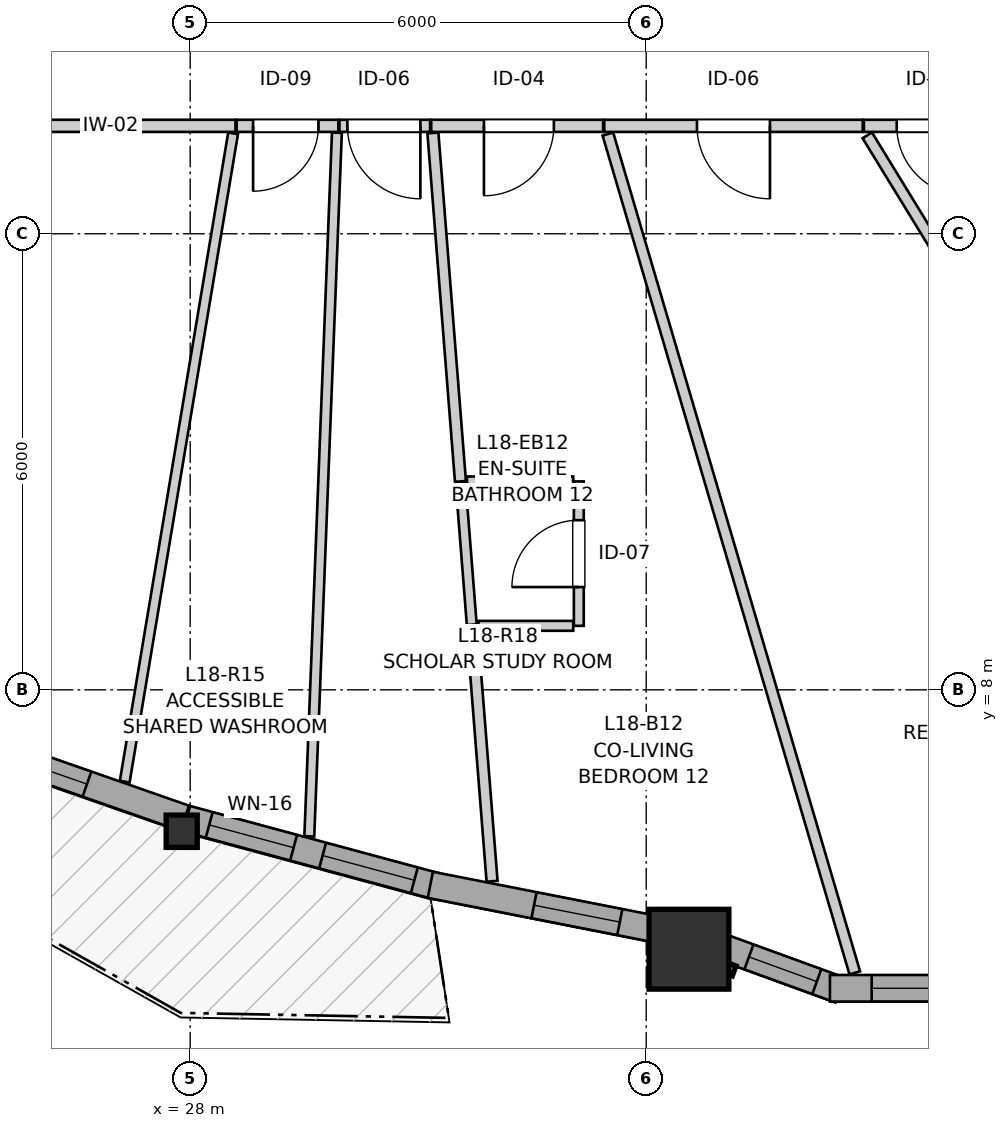
"""IFC4 building model, lengths in metres.
Left out: names, types, materials, properties, quantities, classifications, styles, units other than length and angle.
Written with IfcOpenShell. Run it as: python <this file> out.ifc"""

import sys

from ifc_helpers import new_model, si_unit, direction, frame, frame_2d, origin, origin_2d, place, context, subcontext, project, spatial, rectangle, i_section, extrude, source, transform, mapped, element, fill, save


model = new_model("IFC4")
c1 = context("Model", 3, precision=1e-05, world=origin(), true_north=direction((0.0, 1.0)))
c2 = subcontext(c1, "Body", "Model", "MODEL_VIEW")
j1 = project(units=[si_unit("LENGTHUNIT", "METRE"), si_unit("PLANEANGLEUNIT", "RADIAN")], contexts=[c1])
p1 = place(None, origin())
s1 = spatial("IfcSite", under=j1, at=p1, CompositionType="ELEMENT")
p2 = place(p1, origin())
s2 = spatial("IfcBuilding", under=s1, at=p2, CompositionType="ELEMENT")
p3 = place(p2, frame((0.0, 0.0, 62.2)))
s3 = spatial("IfcBuildingStorey", under=s2, at=p3, CompositionType="ELEMENT", Elevation=62.2)
m1 = source(origin(), c2, "Body", "SweptSolid", [
    extrude(i_section(OverallWidth=0.409, OverallDepth=0.425, WebThickness=0.03, FlangeThickness=0.048, FilletRadius=0.015, at=origin_2d()), origin(), (0.0, 0.0, 1.0), 2.9),
])
p4 = place(p3, frame((27.888, 6.139, 0.0), z_axis=(0.0, 0.0, 1.0), x_axis=(1.0, 0.0, 0.0)))
e1 = element("IfcColumn", 1, at=p4, inside=s3, PredefinedType="PILASTER", context=c2, shape_type="MappedRepresentation", body=[
    mapped(m1, transform((0.0, 0.0, 0.0), x_axis=(1.0, 0.0, 0.0), y_axis=(0.0, 1.0, 0.0), z_axis=(0.0, 0.0, 1.0), scale=1.0)),
])
m2 = source(origin(), c2, "Body", "SweptSolid", [
    extrude(rectangle(XDim=1.05, YDim=1.05, at=origin_2d()), origin(), (0.0, 0.0, 1.0), 2.9),
])
p5 = place(p3, frame((34.562, 4.587, 0.0), z_axis=(0.0, 0.0, 1.0), x_axis=(1.0, 0.0, 0.0)))
e2 = element("IfcColumn", 2, at=p5, inside=s3, PredefinedType="COLUMN", context=c2, shape_type="MappedRepresentation", body=[
    mapped(m2, transform((0.0, 0.0, 0.0), x_axis=(1.0, 0.0, 0.0), y_axis=(0.0, 1.0, 0.0), z_axis=(0.0, 0.0, 1.0), scale=1.0)),
])
p6 = place(p3, frame((24.76, 7.417, 0.0), z_axis=(0.0, 0.0, 1.0), x_axis=(0.944134890247, -0.329559264804, 0.0)))
e3 = element("IfcWall", 3, at=p6, inside=s3, PredefinedType="SOLIDWALL", context=c2, shape_type="SweptSolid", body=[
    extrude(rectangle(XDim=3.354, YDim=0.35, at=frame_2d((1.677, 0.0))), origin(), (0.0, 0.0, 1.0), 2.38),
])
p7 = place(p6, frame((0.543, 0.0, 0.82)))
e4 = element("IfcOpeningElement", 4, at=p7, cuts=e3, PredefinedType="OPENING", context=c2, shape_type="SweptSolid", body=[
    extrude(rectangle(XDim=1.45, YDim=1.25, at=frame_2d((0.725, 0.625))), frame((0.0, 0.185, 0.0), z_axis=(0.0, -1.0, 0.0), x_axis=(1.0, 0.0, 0.0)), (0.0, 0.0, 1.0), 0.37),
])
p8 = place(p3, frame((27.953, 6.303, 0.0), z_axis=(0.0, 0.0, 1.0), x_axis=(0.965464207527, -0.260535724968, 0.0)))
e5 = element("IfcWall", 5, at=p8, inside=s3, PredefinedType="SOLIDWALL", context=c2, shape_type="SweptSolid", body=[
    extrude(rectangle(XDim=3.41, YDim=0.35, at=frame_2d((1.705, 0.0))), origin(), (0.0, 0.0, 1.0), 2.38),
])
p9 = place(p8, frame((0.308, 0.0, 0.82)))
e6 = element("IfcOpeningElement", 6, at=p9, cuts=e5, PredefinedType="OPENING", context=c2, shape_type="SweptSolid", body=[
    extrude(rectangle(XDim=1.15, YDim=1.2, at=frame_2d((0.575, 0.6))), frame((0.0, 0.185, 0.0), z_axis=(0.0, -1.0, 0.0), x_axis=(1.0, 0.0, 0.0)), (0.0, 0.0, 1.0), 0.37),
])
p10 = place(p8, frame((1.853, 0.0, 0.82)))
e7 = element("IfcOpeningElement", 7, at=p10, cuts=e5, PredefinedType="OPENING", context=c2, shape_type="SweptSolid", body=[
    extrude(rectangle(XDim=1.25, YDim=1.35, at=frame_2d((0.625, 0.675))), frame((0.0, 0.185, 0.0), z_axis=(0.0, -1.0, 0.0), x_axis=(1.0, 0.0, 0.0)), (0.0, 0.0, 1.0), 0.37),
])
p11 = place(p3, frame((31.16, 5.435, 0.0), z_axis=(0.0, 0.0, 1.0), x_axis=(0.981237747431, -0.192801667567, 0.0)))
e8 = element("IfcWall", 8, at=p11, inside=s3, PredefinedType="SOLIDWALL", context=c2, shape_type="SweptSolid", body=[
    extrude(rectangle(XDim=3.202, YDim=0.35, at=frame_2d((1.601, 0.0))), origin(), (0.0, 0.0, 1.0), 2.38),
])
p12 = place(p11, frame((1.39, 0.0, 0.82)))
e9 = element("IfcOpeningElement", 9, at=p12, cuts=e8, PredefinedType="OPENING", context=c2, shape_type="SweptSolid", body=[
    extrude(rectangle(XDim=1.15, YDim=1.2, at=frame_2d((0.575, 0.6))), frame((0.0, 0.185, 0.0), z_axis=(0.0, -1.0, 0.0), x_axis=(1.0, 0.0, 0.0)), (0.0, 0.0, 1.0), 0.37),
])
p13 = place(p3, frame((34.904, 4.649, 0.0), z_axis=(0.0, 0.0, 1.0), x_axis=(0.939675390388, -0.342067479745, 0.0)))
e10 = element("IfcWall", 10, at=p13, inside=s3, PredefinedType="SOLIDWALL", context=c2, shape_type="SweptSolid", body=[
    extrude(rectangle(XDim=1.752, YDim=0.35, at=frame_2d((0.876, 0.0))), origin(), (0.0, 0.0, 1.0), 2.38),
])
p14 = place(p13, frame((0.476, 0.0, 0.82)))
e11 = element("IfcOpeningElement", 11, at=p14, cuts=e10, PredefinedType="OPENING", context=c2, shape_type="SweptSolid", body=[
    extrude(rectangle(XDim=0.95, YDim=1.35, at=frame_2d((0.475, 0.675))), frame((0.0, 0.185, 0.0), z_axis=(0.0, -1.0, 0.0), x_axis=(1.0, 0.0, 0.0)), (0.0, 0.0, 1.0), 0.37),
])
p15 = place(p3, frame((36.417, 4.073, 0.0), z_axis=(0.0, 0.0, 1.0), x_axis=(1.0, 0.0, 0.0)))
e12 = element("IfcWall", 12, at=p15, inside=s3, PredefinedType="SOLIDWALL", context=c2, shape_type="SweptSolid", body=[
    extrude(rectangle(XDim=2.091, YDim=0.35, at=frame_2d((1.045, 0.0))), origin(), (0.0, 0.0, 1.0), 2.38),
])
p16 = place(p15, frame((0.549, 0.0, 0.82)))
e13 = element("IfcOpeningElement", 13, at=p16, cuts=e12, PredefinedType="OPENING", context=c2, shape_type="SweptSolid", body=[
    extrude(rectangle(XDim=1.25, YDim=1.35, at=frame_2d((0.625, 0.675))), frame((0.0, 0.185, 0.0), z_axis=(0.0, -1.0, 0.0), x_axis=(1.0, 0.0, 0.0)), (0.0, 0.0, 1.0), 0.37),
])
p17 = place(p3, frame((28.596, 15.42, 0.0), z_axis=(0.0, 0.0, 1.0), x_axis=(-1.0, 0.0, 0.0)))
e14 = element("IfcWall", 14, at=p17, inside=s3, PredefinedType="PARTITIONING", context=c2, shape_type="SweptSolid", body=[
    extrude(rectangle(XDim=6.576, YDim=0.16, at=frame_2d((3.288, 0.0))), origin(), (0.0, 0.0, 1.0), 2.9),
])
p18 = place(p17, frame((2.646, 0.0, 0.0)))
e15 = element("IfcOpeningElement", 15, at=p18, cuts=e14, PredefinedType="OPENING", context=c2, shape_type="SweptSolid", body=[
    extrude(rectangle(XDim=1.3, YDim=2.1, at=frame_2d((0.65, 1.05))), frame((0.0, 0.09, 0.0), z_axis=(0.0, -1.0, 0.0), x_axis=(1.0, 0.0, 0.0)), (0.0, 0.0, 1.0), 0.18),
])
p19 = place(p3, frame((36.849, 15.42, 0.0), z_axis=(0.0, 0.0, 1.0), x_axis=(-1.0, 0.0, 0.0)))
e16 = element("IfcWall", 16, at=p19, inside=s3, PredefinedType="PARTITIONING", context=c2, shape_type="SweptSolid", body=[
    extrude(rectangle(XDim=3.401, YDim=0.16, at=frame_2d((1.701, 0.0))), origin(), (0.0, 0.0, 1.0), 2.9),
])
p20 = place(p19, frame((1.221, 0.0, 0.0)))
e17 = element("IfcOpeningElement", 17, at=p20, cuts=e16, PredefinedType="OPENING", context=c2, shape_type="SweptSolid", body=[
    extrude(rectangle(XDim=0.96, YDim=2.1, at=frame_2d((0.48, 1.05))), frame((0.0, 0.09, 0.0), z_axis=(0.0, -1.0, 0.0), x_axis=(1.0, 0.0, 0.0)), (0.0, 0.0, 1.0), 0.18),
])
p21 = place(p3, frame((33.433, 15.42, 0.0), z_axis=(0.0, 0.0, 1.0), x_axis=(-1.0, 0.0, 0.0)))
e18 = element("IfcWall", 18, at=p21, inside=s3, PredefinedType="PARTITIONING", context=c2, shape_type="SweptSolid", body=[
    extrude(rectangle(XDim=2.262, YDim=0.16, at=frame_2d((1.131, 0.0))), origin(), (0.0, 0.0, 1.0), 2.9),
])
p22 = place(p21, frame((0.648, 0.0, 0.0)))
e19 = element("IfcOpeningElement", 19, at=p22, cuts=e18, PredefinedType="OPENING", context=c2, shape_type="SweptSolid", body=[
    extrude(rectangle(XDim=0.92, YDim=2.1, at=frame_2d((0.46, 1.05))), frame((0.0, 0.09, 0.0), z_axis=(0.0, -1.0, 0.0), x_axis=(1.0, 0.0, 0.0)), (0.0, 0.0, 1.0), 0.18),
])
p23 = place(p3, frame((33.113, 8.842, 0.0), z_axis=(0.0, 0.0, 1.0), x_axis=(0.0, 1.0, 0.0)))
e20 = element("IfcWall", 20, at=p23, inside=s3, PredefinedType="PARTITIONING", context=c2, shape_type="SweptSolid", body=[
    extrude(rectangle(XDim=1.9, YDim=0.13, at=frame_2d((0.95, 0.0))), origin(), (0.0, 0.0, 1.0), 2.268),
])
p24 = place(p23, frame((0.51, 0.0, 0.0)))
e21 = element("IfcOpeningElement", 21, at=p24, cuts=e20, PredefinedType="OPENING", context=c2, shape_type="SweptSolid", body=[
    extrude(rectangle(XDim=0.88, YDim=2.05, at=frame_2d((0.44, 1.025))), frame((0.0, 0.075, 0.0), z_axis=(0.0, -1.0, 0.0), x_axis=(1.0, 0.0, 0.0)), (0.0, 0.0, 1.0), 0.15),
])
p25 = place(p3, frame((38.68, 15.42, 0.0), z_axis=(0.0, 0.0, 1.0), x_axis=(-1.0, 0.0, 0.0)))
e22 = element("IfcWall", 22, at=p25, inside=s3, PredefinedType="PARTITIONING", context=c2, shape_type="SweptSolid", body=[
    extrude(rectangle(XDim=1.816, YDim=0.16, at=frame_2d((0.908, 0.0))), origin(), (0.0, 0.0, 1.0), 2.9),
])
p26 = place(p25, frame((0.464, 0.0, 0.0)))
e23 = element("IfcOpeningElement", 23, at=p26, cuts=e22, PredefinedType="OPENING", context=c2, shape_type="SweptSolid", body=[
    extrude(rectangle(XDim=0.92, YDim=2.1, at=frame_2d((0.46, 1.05))), frame((0.0, 0.09, 0.0), z_axis=(0.0, -1.0, 0.0), x_axis=(1.0, 0.0, 0.0)), (0.0, 0.0, 1.0), 0.18),
])
p27 = place(p3, frame((29.949, 15.42, 0.0), z_axis=(0.0, 0.0, 1.0), x_axis=(-1.0, 0.0, 0.0)))
e24 = element("IfcWall", 24, at=p27, inside=s3, PredefinedType="PARTITIONING", context=c2, shape_type="SweptSolid", body=[
    extrude(rectangle(XDim=1.338, YDim=0.16, at=frame_2d((0.669, 0.0))), origin(), (0.0, 0.0, 1.0), 2.9),
])
p28 = place(p27, frame((0.261, 0.0, 0.0)))
e25 = element("IfcOpeningElement", 25, at=p28, cuts=e24, PredefinedType="OPENING", context=c2, shape_type="SweptSolid", body=[
    extrude(rectangle(XDim=0.86, YDim=2.05, at=frame_2d((0.43, 1.025))), frame((0.0, 0.09, 0.0), z_axis=(0.0, -1.0, 0.0), x_axis=(1.0, 0.0, 0.0)), (0.0, 0.0, 1.0), 0.18),
])
p29 = place(p3, frame((31.156, 15.42, 0.0), z_axis=(0.0, 0.0, 1.0), x_axis=(-1.0, 0.0, 0.0)))
e26 = element("IfcWall", 26, at=p29, inside=s3, PredefinedType="PARTITIONING", context=c2, shape_type="SweptSolid", body=[
    extrude(rectangle(XDim=1.192, YDim=0.16, at=frame_2d((0.596, 0.0))), origin(), (0.0, 0.0, 1.0), 2.9),
])
p30 = place(p29, frame((0.128, 0.0, 0.0)))
e27 = element("IfcOpeningElement", 27, at=p30, cuts=e26, PredefinedType="OPENING", context=c2, shape_type="SweptSolid", body=[
    extrude(rectangle(XDim=0.96, YDim=2.1, at=frame_2d((0.48, 1.05))), frame((0.0, 0.09, 0.0), z_axis=(0.0, -1.0, 0.0), x_axis=(1.0, 0.0, 0.0)), (0.0, 0.0, 1.0), 0.18),
])
p31 = place(p3, frame((33.496, 15.312, 0.0), z_axis=(0.0, 0.0, 1.0), x_axis=(0.282353610079, -0.959310397564, 0.0)))
e28 = element("IfcWall", 28, at=p31, inside=s3, PredefinedType="PARTITIONING", context=c2, shape_type="SweptSolid", body=[
    extrude(rectangle(XDim=11.503, YDim=0.145, at=frame_2d((5.752, 0.0))), origin(), (0.0, 0.0, 1.0), 2.9),
])
p32 = place(p3, frame((36.908, 15.295, 0.0), z_axis=(0.0, 0.0, 1.0), x_axis=(0.522407183079, -0.852696156358, 0.0)))
e29 = element("IfcWall", 29, at=p32, inside=s3, PredefinedType="PARTITIONING", context=c2, shape_type="SweptSolid", body=[
    extrude(rectangle(XDim=9.87, YDim=0.145, at=frame_2d((4.935, 0.0))), origin(), (0.0, 0.0, 1.0), 2.9),
])
p33 = place(p3, frame((29.567, 6.072, 0.0), z_axis=(0.0, 0.0, 1.0), x_axis=(0.039185050788, 0.999231970963, 0.0)))
e30 = element("IfcWall", 30, at=p33, inside=s3, PredefinedType="PARTITIONING", context=c2, shape_type="SweptSolid", body=[
    extrude(rectangle(XDim=9.265, YDim=0.13, at=frame_2d((4.632, 0.0))), origin(), (0.0, 0.0, 1.0), 2.9),
])
p34 = place(p3, frame((27.139, 6.792, 0.0), z_axis=(0.0, 0.0, 1.0), x_axis=(0.164847632872, 0.986319044699, 0.0)))
e31 = element("IfcWall", 31, at=p34, inside=s3, PredefinedType="PARTITIONING", context=c2, shape_type="SweptSolid", body=[
    extrude(rectangle(XDim=8.648, YDim=0.13, at=frame_2d((4.324, 0.0))), origin(), (0.0, 0.0, 1.0), 2.9),
])
p35 = place(p3, frame((31.193, 15.326, 0.0), z_axis=(0.0, 0.0, 1.0), x_axis=(0.078835771191, -0.996887617127, 0.0)))
e32 = element("IfcWall", 32, at=p35, inside=s3, PredefinedType="PARTITIONING", context=c2, shape_type="SweptSolid", body=[
    extrude(rectangle(XDim=4.599, YDim=0.145, at=frame_2d((2.299, 0.0))), origin(), (0.0, 0.0, 1.0), 2.9),
])
p36 = place(p3, frame((31.706, 8.842, 0.0), z_axis=(0.0, 0.0, 1.0), x_axis=(0.078861571463, -0.996885576456, 0.0)))
e33 = element("IfcWall", 33, at=p36, inside=s3, PredefinedType="PARTITIONING", context=c2, shape_type="SweptSolid", body=[
    extrude(rectangle(XDim=3.371, YDim=0.145, at=frame_2d((1.686, 0.0))), origin(), (0.0, 0.0, 1.0), 2.9),
])
p37 = place(p3, frame((31.557, 10.727, 0.0), z_axis=(0.0, 0.0, 1.0), x_axis=(0.078736521399, -0.996895461018, 0.0)))
e34 = element("IfcWall", 34, at=p37, inside=s3, PredefinedType="PARTITIONING", context=c2, shape_type="SweptSolid", body=[
    extrude(rectangle(XDim=1.876, YDim=0.13, at=frame_2d((0.938, 0.0))), origin(), (0.0, 0.0, 1.0), 2.9),
])
p38 = place(p3, frame((31.642, 10.742, 0.0), z_axis=(0.0, 0.0, 1.0), x_axis=(1.0, 0.0, 0.0)))
e35 = element("IfcWall", 35, at=p38, inside=s3, PredefinedType="PARTITIONING", context=c2, shape_type="SweptSolid", body=[
    extrude(rectangle(XDim=1.398, YDim=0.13, at=frame_2d((0.699, 0.0))), origin(), (0.0, 0.0, 1.0), 2.9),
])
p39 = place(p3, frame((31.792, 8.842, 0.0), z_axis=(0.0, 0.0, 1.0), x_axis=(1.0, 0.0, 0.0)))
e36 = element("IfcWall", 36, at=p39, inside=s3, PredefinedType="PARTITIONING", context=c2, shape_type="SweptSolid", body=[
    extrude(rectangle(XDim=1.248, YDim=0.13, at=frame_2d((0.624, 0.0))), origin(), (0.0, 0.0, 1.0), 2.468),
])
m3 = source(origin(), c2, "Body", "SweptSolid", [
    extrude(rectangle(XDim=1.45, YDim=1.25, at=frame_2d((0.725, 0.625))), frame((0.0, 0.03, 0.0), z_axis=(0.0, -1.0, 0.0), x_axis=(1.0, 0.0, 0.0)), (0.0, 0.0, 1.0), 0.06),
])
p40 = place(p7, origin())
e37 = element("IfcWindow", 37, at=p40, inside=s3, PartitioningType="SINGLE_PANEL", PredefinedType="WINDOW", context=c2, shape_type="MappedRepresentation", body=[
    mapped(m3, transform((0.0, 0.0, 0.0), x_axis=(1.0, 0.0, 0.0), y_axis=(0.0, 1.0, 0.0), z_axis=(0.0, 0.0, 1.0), scale=1.0)),
])
fill(e4, e37)
m4 = source(origin(), c2, "Body", "SweptSolid", [
    extrude(rectangle(XDim=1.15, YDim=1.2, at=frame_2d((0.575, 0.6))), frame((0.0, 0.03, 0.0), z_axis=(0.0, -1.0, 0.0), x_axis=(1.0, 0.0, 0.0)), (0.0, 0.0, 1.0), 0.06),
])
p41 = place(p9, origin())
e38 = element("IfcWindow", 38, at=p41, inside=s3, PartitioningType="SINGLE_PANEL", PredefinedType="WINDOW", context=c2, shape_type="MappedRepresentation", body=[
    mapped(m4, transform((0.0, 0.0, 0.0), x_axis=(1.0, 0.0, 0.0), y_axis=(0.0, 1.0, 0.0), z_axis=(0.0, 0.0, 1.0), scale=1.0)),
])
fill(e6, e38)
m5 = source(origin(), c2, "Body", "SweptSolid", [
    extrude(rectangle(XDim=1.25, YDim=1.35, at=frame_2d((0.625, 0.675))), frame((0.0, 0.03, 0.0), z_axis=(0.0, -1.0, 0.0), x_axis=(1.0, 0.0, 0.0)), (0.0, 0.0, 1.0), 0.06),
])
p42 = place(p10, origin())
e39 = element("IfcWindow", 39, at=p42, inside=s3, PartitioningType="SINGLE_PANEL", PredefinedType="WINDOW", context=c2, shape_type="MappedRepresentation", body=[
    mapped(m5, transform((0.0, 0.0, 0.0), x_axis=(1.0, 0.0, 0.0), y_axis=(0.0, 1.0, 0.0), z_axis=(0.0, 0.0, 1.0), scale=1.0)),
])
fill(e7, e39)
p43 = place(p12, origin())
e40 = element("IfcWindow", 40, at=p43, inside=s3, PartitioningType="SINGLE_PANEL", PredefinedType="WINDOW", context=c2, shape_type="MappedRepresentation", body=[
    mapped(m4, transform((0.0, 0.0, 0.0), x_axis=(1.0, 0.0, 0.0), y_axis=(0.0, 1.0, 0.0), z_axis=(0.0, 0.0, 1.0), scale=1.0)),
])
fill(e9, e40)
m6 = source(origin(), c2, "Body", "SweptSolid", [
    extrude(rectangle(XDim=0.95, YDim=1.35, at=frame_2d((0.475, 0.675))), frame((0.0, 0.03, 0.0), z_axis=(0.0, -1.0, 0.0), x_axis=(1.0, 0.0, 0.0)), (0.0, 0.0, 1.0), 0.06),
])
p44 = place(p14, origin())
e41 = element("IfcWindow", 41, at=p44, inside=s3, PartitioningType="SINGLE_PANEL", PredefinedType="WINDOW", context=c2, shape_type="MappedRepresentation", body=[
    mapped(m6, transform((0.0, 0.0, 0.0), x_axis=(1.0, 0.0, 0.0), y_axis=(0.0, 1.0, 0.0), z_axis=(0.0, 0.0, 1.0), scale=1.0)),
])
fill(e11, e41)
p45 = place(p16, origin())
e42 = element("IfcWindow", 42, at=p45, inside=s3, PartitioningType="SINGLE_PANEL", PredefinedType="WINDOW", context=c2, shape_type="MappedRepresentation", body=[
    mapped(m5, transform((0.0, 0.0, 0.0), x_axis=(1.0, 0.0, 0.0), y_axis=(0.0, 1.0, 0.0), z_axis=(0.0, 0.0, 1.0), scale=1.0)),
])
fill(e13, e42)
m7 = source(origin(), c2, "Body", "SweptSolid", [
    extrude(rectangle(XDim=0.96, YDim=2.1, at=frame_2d((0.48, 1.05))), frame((0.0, 0.025, 0.0), z_axis=(0.0, -1.0, 0.0), x_axis=(1.0, 0.0, 0.0)), (0.0, 0.0, 1.0), 0.05),
])
p46 = place(p20, origin())
e43 = element("IfcDoor", 43, at=p46, inside=s3, OperationType="SINGLE_SWING_LEFT", PredefinedType="DOOR", context=c2, shape_type="MappedRepresentation", body=[
    mapped(m7, transform((0.0, 0.0, 0.0), x_axis=(1.0, 0.0, 0.0), y_axis=(0.0, 1.0, 0.0), z_axis=(0.0, 0.0, 1.0), scale=1.0)),
])
fill(e17, e43)
m8 = source(origin(), c2, "Body", "SweptSolid", [
    extrude(rectangle(XDim=0.92, YDim=2.1, at=frame_2d((0.46, 1.05))), frame((0.0, 0.025, 0.0), z_axis=(0.0, -1.0, 0.0), x_axis=(1.0, 0.0, 0.0)), (0.0, 0.0, 1.0), 0.05),
])
p47 = place(p22, origin())
e44 = element("IfcDoor", 44, at=p47, inside=s3, OperationType="SINGLE_SWING_RIGHT", PredefinedType="DOOR", context=c2, shape_type="MappedRepresentation", body=[
    mapped(m8, transform((0.0, 0.0, 0.0), x_axis=(1.0, 0.0, 0.0), y_axis=(0.0, 1.0, 0.0), z_axis=(0.0, 0.0, 1.0), scale=1.0)),
])
fill(e19, e44)
m9 = source(origin(), c2, "Body", "SweptSolid", [
    extrude(rectangle(XDim=0.88, YDim=2.05, at=frame_2d((0.44, 1.025))), frame((0.0, 0.025, 0.0), z_axis=(0.0, -1.0, 0.0), x_axis=(1.0, 0.0, 0.0)), (0.0, 0.0, 1.0), 0.05),
])
p48 = place(p24, origin())
e45 = element("IfcDoor", 45, at=p48, inside=s3, OperationType="SINGLE_SWING_LEFT", PredefinedType="DOOR", context=c2, shape_type="MappedRepresentation", body=[
    mapped(m9, transform((0.0, 0.0, 0.0), x_axis=(1.0, 0.0, 0.0), y_axis=(0.0, 1.0, 0.0), z_axis=(0.0, 0.0, 1.0), scale=1.0)),
])
fill(e21, e45)
p49 = place(p26, origin())
e46 = element("IfcDoor", 46, at=p49, inside=s3, OperationType="SINGLE_SWING_LEFT", PredefinedType="DOOR", context=c2, shape_type="MappedRepresentation", body=[
    mapped(m8, transform((0.0, 0.0, 0.0), x_axis=(1.0, 0.0, 0.0), y_axis=(0.0, 1.0, 0.0), z_axis=(0.0, 0.0, 1.0), scale=1.0)),
])
fill(e23, e46)
m10 = source(origin(), c2, "Body", "SweptSolid", [
    extrude(rectangle(XDim=0.86, YDim=2.05, at=frame_2d((0.43, 1.025))), frame((0.0, 0.025, 0.0), z_axis=(0.0, -1.0, 0.0), x_axis=(1.0, 0.0, 0.0)), (0.0, 0.0, 1.0), 0.05),
])
p50 = place(p28, origin())
e47 = element("IfcDoor", 47, at=p50, inside=s3, OperationType="SINGLE_SWING_RIGHT", PredefinedType="DOOR", context=c2, shape_type="MappedRepresentation", body=[
    mapped(m10, transform((0.0, 0.0, 0.0), x_axis=(1.0, 0.0, 0.0), y_axis=(0.0, 1.0, 0.0), z_axis=(0.0, 0.0, 1.0), scale=1.0)),
])
fill(e25, e47)
p51 = place(p30, origin())
e48 = element("IfcDoor", 48, at=p51, inside=s3, OperationType="SINGLE_SWING_LEFT", PredefinedType="DOOR", context=c2, shape_type="MappedRepresentation", body=[
    mapped(m7, transform((0.0, 0.0, 0.0), x_axis=(1.0, 0.0, 0.0), y_axis=(0.0, 1.0, 0.0), z_axis=(0.0, 0.0, 1.0), scale=1.0)),
])
fill(e27, e48)
save(model, sys.argv[1])
